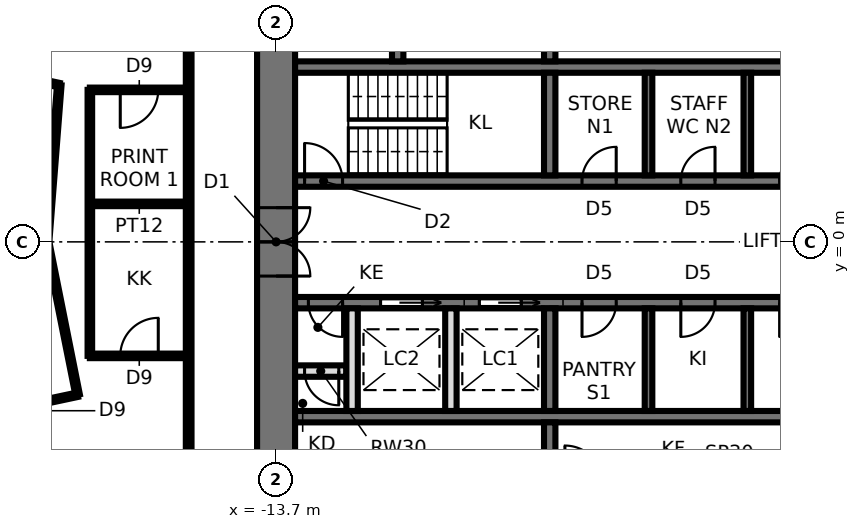
"""IFC4 building model, lengths in metres.
Left out: names, types, materials, properties, quantities, classifications, styles, units other than length and angle.
Written with IfcOpenShell. Run it as: python <this file> out.ifc"""

import sys

from ifc_helpers import new_model, si_unit, direction, frame, frame_2d, origin, place, context, subcontext, project, spatial, rectangle, extrude, element, fill, save


model = new_model("IFC4")
c1 = context("Model", 3, precision=1e-05, world=origin(), true_north=direction((0.0, 1.0)))
c2 = subcontext(c1, "Body", "Model", "MODEL_VIEW")
j1 = project(units=[si_unit("LENGTHUNIT", "METRE"), si_unit("PLANEANGLEUNIT", "RADIAN")], contexts=[c1])
p1 = place(None, origin())
s1 = spatial("IfcSite", under=j1, at=p1, CompositionType="ELEMENT")
p2 = place(p1, origin())
s2 = spatial("IfcBuilding", under=s1, at=p2, CompositionType="ELEMENT")
p3 = place(p2, frame((0.0, 0.0, 176.0)))
s3 = spatial("IfcBuildingStorey", under=s2, at=p3, CompositionType="ELEMENT", Elevation=176.0)
p4 = place(p3, frame((-13.7, 9.5, 0.0), z_axis=(0.0, 0.0, 1.0), x_axis=(0.0, -1.0, 0.0)))
e1 = element("IfcWall", 1, at=p4, inside=s3, PredefinedType="SHEAR", context=c2, shape_type="SweptSolid", body=[
    extrude(rectangle(XDim=19.0, YDim=1.0, at=frame_2d((9.5, 0.0))), origin(), (0.0, 0.0, 1.0), 3.9),
])
p5 = place(p4, frame((8.6, 0.0, 0.0)))
e2 = element("IfcOpeningElement", 2, at=p5, cuts=e1, PredefinedType="OPENING", context=c2, shape_type="SweptSolid", body=[
    extrude(rectangle(XDim=1.8, YDim=2.4, at=frame_2d((0.9, 1.2))), frame((0.0, 0.51, 0.0), z_axis=(0.0, -1.0, 0.0), x_axis=(1.0, 0.0, 0.0)), (0.0, 0.0, 1.0), 1.02),
])
p6 = place(p3, frame((-13.2, 1.6, 0.0), z_axis=(0.0, 0.0, 1.0), x_axis=(1.0, 0.0, 0.0)))
e3 = element("IfcWall", 3, at=p6, inside=s3, PredefinedType="SHEAR", context=c2, shape_type="SweptSolid", body=[
    extrude(rectangle(XDim=26.4, YDim=0.3, at=frame_2d((13.2, 0.0))), origin(), (0.0, 0.0, 1.0), 3.9),
])
p7 = place(p6, frame((0.25, 0.0, 0.0)))
e4 = element("IfcOpeningElement", 4, at=p7, cuts=e3, PredefinedType="OPENING", context=c2, shape_type="SweptSolid", body=[
    extrude(rectangle(XDim=1.0, YDim=2.1, at=frame_2d((0.5, 1.05))), frame((0.0, 0.16, 0.0), z_axis=(0.0, -1.0, 0.0), x_axis=(1.0, 0.0, 0.0)), (0.0, 0.0, 1.0), 0.32),
])
p8 = place(p6, frame((23.05, 0.0, 0.0)))
e5 = element("IfcOpeningElement", 5, at=p8, cuts=e3, PredefinedType="OPENING", context=c2, shape_type="SweptSolid", body=[
    extrude(rectangle(XDim=1.1, YDim=2.3, at=frame_2d((0.55, 1.15))), frame((0.0, 0.16, 0.0), z_axis=(0.0, -1.0, 0.0), x_axis=(1.0, 0.0, 0.0)), (0.0, 0.0, 1.0), 0.32),
])
p9 = place(p6, frame((20.25, 0.0, 0.0)))
e6 = element("IfcOpeningElement", 6, at=p9, cuts=e3, PredefinedType="OPENING", context=c2, shape_type="SweptSolid", body=[
    extrude(rectangle(XDim=1.5, YDim=2.4, at=frame_2d((0.75, 1.2))), frame((0.0, 0.16, 0.0), z_axis=(0.0, -1.0, 0.0), x_axis=(1.0, 0.0, 0.0)), (0.0, 0.0, 1.0), 0.32),
])
p10 = place(p6, frame((7.55, 0.0, 0.0)))
e7 = element("IfcOpeningElement", 7, at=p10, cuts=e3, PredefinedType="OPENING", context=c2, shape_type="SweptSolid", body=[
    extrude(rectangle(XDim=0.9, YDim=2.1, at=frame_2d((0.45, 1.05))), frame((0.0, 0.16, 0.0), z_axis=(0.0, -1.0, 0.0), x_axis=(1.0, 0.0, 0.0)), (0.0, 0.0, 1.0), 0.32),
])
p11 = place(p6, frame((10.15, 0.0, 0.0)))
e8 = element("IfcOpeningElement", 8, at=p11, cuts=e3, PredefinedType="OPENING", context=c2, shape_type="SweptSolid", body=[
    extrude(rectangle(XDim=0.9, YDim=2.1, at=frame_2d((0.45, 1.05))), frame((0.0, 0.16, 0.0), z_axis=(0.0, -1.0, 0.0), x_axis=(1.0, 0.0, 0.0)), (0.0, 0.0, 1.0), 0.32),
])
p12 = place(p6, frame((12.75, 0.0, 0.0)))
e9 = element("IfcOpeningElement", 9, at=p12, cuts=e3, PredefinedType="OPENING", context=c2, shape_type="SweptSolid", body=[
    extrude(rectangle(XDim=0.9, YDim=2.1, at=frame_2d((0.45, 1.05))), frame((0.0, 0.16, 0.0), z_axis=(0.0, -1.0, 0.0), x_axis=(1.0, 0.0, 0.0)), (0.0, 0.0, 1.0), 0.32),
])
p13 = place(p6, frame((25.45, 0.0, 0.0)))
e10 = element("IfcOpeningElement", 10, at=p13, cuts=e3, PredefinedType="OPENING", context=c2, shape_type="SweptSolid", body=[
    extrude(rectangle(XDim=0.9, YDim=2.1, at=frame_2d((0.45, 1.05))), frame((0.0, 0.16, 0.0), z_axis=(0.0, -1.0, 0.0), x_axis=(1.0, 0.0, 0.0)), (0.0, 0.0, 1.0), 0.32),
])
p14 = place(p3, frame((-13.2, -1.6, 0.0), z_axis=(0.0, 0.0, 1.0), x_axis=(1.0, 0.0, 0.0)))
e11 = element("IfcWall", 11, at=p14, inside=s3, PredefinedType="SHEAR", context=c2, shape_type="SweptSolid", body=[
    extrude(rectangle(XDim=26.4, YDim=0.3, at=frame_2d((13.2, 0.0))), origin(), (0.0, 0.0, 1.0), 3.9),
])
p15 = place(p14, frame((25.15, 0.0, 0.0)))
e12 = element("IfcOpeningElement", 12, at=p15, cuts=e11, PredefinedType="OPENING", context=c2, shape_type="SweptSolid", body=[
    extrude(rectangle(XDim=1.0, YDim=2.1, at=frame_2d((0.5, 1.05))), frame((0.0, 0.16, 0.0), z_axis=(0.0, -1.0, 0.0), x_axis=(1.0, 0.0, 0.0)), (0.0, 0.0, 1.0), 0.32),
])
p16 = place(p14, frame((7.55, 0.0, 0.0)))
e13 = element("IfcOpeningElement", 13, at=p16, cuts=e11, PredefinedType="OPENING", context=c2, shape_type="SweptSolid", body=[
    extrude(rectangle(XDim=0.9, YDim=2.1, at=frame_2d((0.45, 1.05))), frame((0.0, 0.16, 0.0), z_axis=(0.0, -1.0, 0.0), x_axis=(1.0, 0.0, 0.0)), (0.0, 0.0, 1.0), 0.32),
])
p17 = place(p14, frame((10.15, 0.0, 0.0)))
e14 = element("IfcOpeningElement", 14, at=p17, cuts=e11, PredefinedType="OPENING", context=c2, shape_type="SweptSolid", body=[
    extrude(rectangle(XDim=0.9, YDim=2.1, at=frame_2d((0.45, 1.05))), frame((0.0, 0.16, 0.0), z_axis=(0.0, -1.0, 0.0), x_axis=(1.0, 0.0, 0.0)), (0.0, 0.0, 1.0), 0.32),
])
p18 = place(p14, frame((12.75, 0.0, 0.0)))
e15 = element("IfcOpeningElement", 15, at=p18, cuts=e11, PredefinedType="OPENING", context=c2, shape_type="SweptSolid", body=[
    extrude(rectangle(XDim=0.9, YDim=2.1, at=frame_2d((0.45, 1.05))), frame((0.0, 0.16, 0.0), z_axis=(0.0, -1.0, 0.0), x_axis=(1.0, 0.0, 0.0)), (0.0, 0.0, 1.0), 0.32),
])
p19 = place(p14, frame((15.25, 0.0, 0.0)))
e16 = element("IfcOpeningElement", 16, at=p19, cuts=e11, PredefinedType="OPENING", context=c2, shape_type="SweptSolid", body=[
    extrude(rectangle(XDim=1.1, YDim=2.3, at=frame_2d((0.55, 1.15))), frame((0.0, 0.16, 0.0), z_axis=(0.0, -1.0, 0.0), x_axis=(1.0, 0.0, 0.0)), (0.0, 0.0, 1.0), 0.32),
])
p20 = place(p14, frame((17.85, 0.0, 0.0)))
e17 = element("IfcOpeningElement", 17, at=p20, cuts=e11, PredefinedType="OPENING", context=c2, shape_type="SweptSolid", body=[
    extrude(rectangle(XDim=1.1, YDim=2.3, at=frame_2d((0.55, 1.15))), frame((0.0, 0.16, 0.0), z_axis=(0.0, -1.0, 0.0), x_axis=(1.0, 0.0, 0.0)), (0.0, 0.0, 1.0), 0.32),
])
p21 = place(p14, frame((4.85, 0.0, 0.0)))
e18 = element("IfcOpeningElement", 18, at=p21, cuts=e11, PredefinedType="OPENING", context=c2, shape_type="SweptSolid", body=[
    extrude(rectangle(XDim=1.1, YDim=2.3, at=frame_2d((0.55, 1.15))), frame((0.0, 0.16, 0.0), z_axis=(0.0, -1.0, 0.0), x_axis=(1.0, 0.0, 0.0)), (0.0, 0.0, 1.0), 0.32),
])
p22 = place(p14, frame((2.25, 0.0, 0.0)))
e19 = element("IfcOpeningElement", 19, at=p22, cuts=e11, PredefinedType="OPENING", context=c2, shape_type="SweptSolid", body=[
    extrude(rectangle(XDim=1.1, YDim=2.3, at=frame_2d((0.55, 1.15))), frame((0.0, 0.16, 0.0), z_axis=(0.0, -1.0, 0.0), x_axis=(1.0, 0.0, 0.0)), (0.0, 0.0, 1.0), 0.32),
])
p23 = place(p14, frame((0.35, 0.0, 0.0)))
e20 = element("IfcOpeningElement", 20, at=p23, cuts=e11, PredefinedType="OPENING", context=c2, shape_type="SweptSolid", body=[
    extrude(rectangle(XDim=0.9, YDim=2.1, at=frame_2d((0.45, 1.05))), frame((0.0, 0.16, 0.0), z_axis=(0.0, -1.0, 0.0), x_axis=(1.0, 0.0, 0.0)), (0.0, 0.0, 1.0), 0.32),
])
for number, where, z_axis, x_axis in (
    (21, (-13.2, 4.6, 0.0), (0.0, 0.0, 1.0), (1.0, 0.0, 0.0)),
    (22, (-13.2, -4.6, 0.0), (0.0, 0.0, 1.0), (1.0, 0.0, 0.0)),
):
    element("IfcWall", number, at=place(p3, frame(where, z_axis=z_axis, x_axis=x_axis)), inside=s3, PredefinedType="SHEAR", context=c2, shape_type="SweptSolid", body=[
        extrude(rectangle(XDim=26.4, YDim=0.3, at=frame_2d((13.2, 0.0))), origin(), (0.0, 0.0, 1.0), 3.9),
    ])
p24 = place(p3, frame((-6.5, 1.75, 0.0), z_axis=(0.0, 0.0, 1.0), x_axis=(0.0, 1.0, 0.0)))
e23 = element("IfcWall", 23, at=p24, inside=s3, PredefinedType="SHEAR", context=c2, shape_type="SweptSolid", body=[
    extrude(rectangle(XDim=2.7, YDim=0.3, at=frame_2d((1.35, 0.0))), origin(), (0.0, 0.0, 1.0), 3.9),
])
p25 = place(p3, frame((-6.5, 4.75, 0.0), z_axis=(0.0, 0.0, 1.0), x_axis=(0.0, 1.0, 0.0)))
e24 = element("IfcWall", 24, at=p25, inside=s3, PredefinedType="SHEAR", context=c2, shape_type="SweptSolid", body=[
    extrude(rectangle(XDim=3.75, YDim=0.3, at=frame_2d((1.875, 0.0))), origin(), (0.0, 0.0, 1.0), 3.9),
])
for number, where, z_axis, x_axis in (
    (25, (-3.9, 1.75, 0.0), (0.0, 0.0, 1.0), (0.0, 1.0, 0.0)),
    (26, (-1.3, 1.75, 0.0), (0.0, 0.0, 1.0), (0.0, 1.0, 0.0)),
):
    element("IfcWall", number, at=place(p3, frame(where, z_axis=z_axis, x_axis=x_axis)), inside=s3, PredefinedType="SHEAR", context=c2, shape_type="SweptSolid", body=[
        extrude(rectangle(XDim=2.7, YDim=0.2, at=frame_2d((1.35, 0.0))), origin(), (0.0, 0.0, 1.0), 3.9),
    ])
p26 = place(p3, frame((-6.5, -1.75, 0.0), z_axis=(0.0, 0.0, 1.0), x_axis=(0.0, -1.0, 0.0)))
e27 = element("IfcWall", 27, at=p26, inside=s3, PredefinedType="SHEAR", context=c2, shape_type="SweptSolid", body=[
    extrude(rectangle(XDim=2.7, YDim=0.3, at=frame_2d((1.35, 0.0))), origin(), (0.0, 0.0, 1.0), 3.9),
])
p27 = place(p3, frame((-6.5, -4.75, 0.0), z_axis=(0.0, 0.0, 1.0), x_axis=(0.0, -1.0, 0.0)))
e28 = element("IfcWall", 28, at=p27, inside=s3, PredefinedType="SHEAR", context=c2, shape_type="SweptSolid", body=[
    extrude(rectangle(XDim=3.75, YDim=0.3, at=frame_2d((1.875, 0.0))), origin(), (0.0, 0.0, 1.0), 3.9),
])
for number, where, z_axis, x_axis in (
    (29, (-3.9, -1.75, 0.0), (0.0, 0.0, 1.0), (0.0, -1.0, 0.0)),
    (30, (-1.3, -1.75, 0.0), (0.0, 0.0, 1.0), (0.0, -1.0, 0.0)),
):
    element("IfcWall", number, at=place(p3, frame(where, z_axis=z_axis, x_axis=x_axis)), inside=s3, PredefinedType="SHEAR", context=c2, shape_type="SweptSolid", body=[
        extrude(rectangle(XDim=2.7, YDim=0.2, at=frame_2d((1.35, 0.0))), origin(), (0.0, 0.0, 1.0), 3.9),
    ])
p28 = place(p3, frame((-10.5, 4.75, 0.0), z_axis=(0.0, 0.0, 1.0), x_axis=(0.0, 1.0, 0.0)))
e31 = element("IfcWall", 31, at=p28, inside=s3, PredefinedType="SHEAR", context=c2, shape_type="SweptSolid", body=[
    extrude(rectangle(XDim=3.75, YDim=0.3, at=frame_2d((1.875, 0.0))), origin(), (0.0, 0.0, 1.0), 3.9),
])
p29 = place(p3, frame((-13.2, -3.4, 0.0), z_axis=(0.0, 0.0, 1.0), x_axis=(1.0, 0.0, 0.0)))
e32 = element("IfcWall", 32, at=p29, inside=s3, PredefinedType="SOLIDWALL", context=c2, shape_type="SweptSolid", body=[
    extrude(rectangle(XDim=1.35, YDim=0.3, at=frame_2d((0.675, 0.0))), origin(), (0.0, 0.0, 1.0), 3.74),
])
p30 = place(p29, frame((0.25, 0.0, 0.0)))
e33 = element("IfcOpeningElement", 33, at=p30, cuts=e32, PredefinedType="OPENING", context=c2, shape_type="SweptSolid", body=[
    extrude(rectangle(XDim=0.9, YDim=2.1, at=frame_2d((0.45, 1.05))), frame((0.0, 0.16, 0.0), z_axis=(0.0, -1.0, 0.0), x_axis=(1.0, 0.0, 0.0)), (0.0, 0.0, 1.0), 0.32),
])
for number, where, z_axis, x_axis in (
    (34, (-9.1, -1.75, 0.0), (0.0, 0.0, 1.0), (0.0, -1.0, 0.0)),
    (35, (-11.7, -1.75, 0.0), (0.0, 0.0, 1.0), (0.0, -1.0, 0.0)),
):
    element("IfcWall", number, at=place(p3, frame(where, z_axis=z_axis, x_axis=x_axis)), inside=s3, PredefinedType="SOLIDWALL", context=c2, shape_type="SweptSolid", body=[
        extrude(rectangle(XDim=2.7, YDim=0.3, at=frame_2d((1.35, 0.0))), origin(), (0.0, 0.0, 1.0), 3.74),
    ])
p31 = place(p3, frame((-18.922, -4.022, 0.0), z_axis=(0.0, 0.0, 1.0), x_axis=(-0.195944435797, 0.980614999926, 0.0)))
e36 = element("IfcWall", 36, at=p31, inside=s3, PredefinedType="PARTITIONING", context=c2, shape_type="SweptSolid", body=[
    extrude(rectangle(XDim=4.102, YDim=0.12, at=frame_2d((2.051, 0.0))), origin(), (0.0, 0.0, 1.0), 3.74),
])
p32 = place(p3, frame((-18.6, -3.0, 0.0), z_axis=(0.0, 0.0, 1.0), x_axis=(1.0, 0.0, 0.0)))
e37 = element("IfcWall", 37, at=p32, inside=s3, PredefinedType="PARTITIONING", context=c2, shape_type="SweptSolid", body=[
    extrude(rectangle(XDim=2.6, YDim=0.12, at=frame_2d((1.3, 0.0))), origin(), (0.0, 0.0, 1.0), 3.74),
])
p33 = place(p32, frame((0.8, 0.0, 0.0)))
e38 = element("IfcOpeningElement", 38, at=p33, cuts=e37, PredefinedType="OPENING", context=c2, shape_type="SweptSolid", body=[
    extrude(rectangle(XDim=1.0, YDim=2.4, at=frame_2d((0.5, 1.2))), frame((0.0, 0.07, 0.0), z_axis=(0.0, -1.0, 0.0), x_axis=(1.0, 0.0, 0.0)), (0.0, 0.0, 1.0), 0.14),
])
p34 = place(p3, frame((-22.835, -4.854, 0.0), z_axis=(0.0, 0.0, 1.0), x_axis=(0.978152955943, 0.207886494942, 0.0)))
e39 = element("IfcWall", 39, at=p34, inside=s3, PredefinedType="PARTITIONING", context=c2, shape_type="SweptSolid", body=[
    extrude(rectangle(XDim=4.0, YDim=0.12, at=frame_2d((2.0, 0.0))), origin(), (0.0, 0.0, 1.0), 3.74),
])
p35 = place(p34, frame((1.474, 0.0, 0.0)))
e40 = element("IfcOpeningElement", 40, at=p35, cuts=e39, PredefinedType="OPENING", context=c2, shape_type="SweptSolid", body=[
    extrude(rectangle(XDim=1.0, YDim=2.4, at=frame_2d((0.5, 1.2))), frame((0.0, 0.07, 0.0), z_axis=(0.0, -1.0, 0.0), x_axis=(1.0, 0.0, 0.0)), (0.0, 0.0, 1.0), 0.14),
])
p36 = place(p3, frame((-16.0, 4.0, 0.0), z_axis=(0.0, 0.0, 1.0), x_axis=(-1.0, 0.0, 0.0)))
e41 = element("IfcWall", 41, at=p36, inside=s3, PredefinedType="PARTITIONING", context=c2, shape_type="SweptSolid", body=[
    extrude(rectangle(XDim=2.6, YDim=0.12, at=frame_2d((1.3, 0.0))), origin(), (0.0, 0.0, 1.0), 3.74),
])
p37 = place(p36, frame((0.8, 0.0, 0.0)))
e42 = element("IfcOpeningElement", 42, at=p37, cuts=e41, PredefinedType="OPENING", context=c2, shape_type="SweptSolid", body=[
    extrude(rectangle(XDim=1.0, YDim=2.4, at=frame_2d((0.5, 1.2))), frame((0.0, 0.07, 0.0), z_axis=(0.0, -1.0, 0.0), x_axis=(1.0, 0.0, 0.0)), (0.0, 0.0, 1.0), 0.14),
])
p38 = place(p3, frame((-19.405, 4.125, 0.0), z_axis=(0.0, 0.0, 1.0), x_axis=(-0.978140543132, 0.207944891454, 0.0)))
e43 = element("IfcWall", 43, at=p38, inside=s3, PredefinedType="PARTITIONING", context=c2, shape_type="SweptSolid", body=[
    extrude(rectangle(XDim=4.0, YDim=0.12, at=frame_2d((2.0, 0.0))), origin(), (0.0, 0.0, 1.0), 3.74),
])
p39 = place(p38, frame((1.474, 0.0, 0.0)))
e44 = element("IfcOpeningElement", 44, at=p39, cuts=e43, PredefinedType="OPENING", context=c2, shape_type="SweptSolid", body=[
    extrude(rectangle(XDim=1.0, YDim=2.4, at=frame_2d((0.5, 1.2))), frame((0.0, 0.07, 0.0), z_axis=(0.0, -1.0, 0.0), x_axis=(1.0, 0.0, 0.0)), (0.0, 0.0, 1.0), 0.14),
])
p40 = place(p3, frame((-19.726, 0.0, 0.0), z_axis=(0.0, 0.0, 1.0), x_axis=(0.077720864456, 0.996975158782, 0.0)))
e45 = element("IfcWall", 45, at=p40, inside=s3, PredefinedType="PARTITIONING", context=c2, shape_type="SweptSolid", body=[
    extrude(rectangle(XDim=4.137, YDim=0.12, at=frame_2d((2.068, 0.0))), origin(), (0.0, 0.0, 1.0), 3.74),
])
p41 = place(p3, frame((-18.6, 1.0, 0.0), z_axis=(0.0, 0.0, 1.0), x_axis=(1.0, 0.0, 0.0)))
e46 = element("IfcWall", 46, at=p41, inside=s3, PredefinedType="PARTITIONING", context=c2, shape_type="SweptSolid", body=[
    extrude(rectangle(XDim=2.6, YDim=0.12, at=frame_2d((1.3, 0.0))), origin(), (0.0, 0.0, 1.0), 3.74),
])
p42 = place(p3, frame((-18.6, 4.0, 0.0), z_axis=(0.0, 0.0, 1.0), x_axis=(0.0, -1.0, 0.0)))
e47 = element("IfcWall", 47, at=p42, inside=s3, PredefinedType="PARTITIONING", context=c2, shape_type="SweptSolid", body=[
    extrude(rectangle(XDim=7.0, YDim=0.12, at=frame_2d((3.5, 0.0))), origin(), (0.0, 0.0, 1.0), 3.74),
])
p43 = place(p3, frame((-16.0, 11.3, 0.0), z_axis=(0.0, 0.0, 1.0), x_axis=(0.0, -1.0, 0.0)))
e48 = element("IfcWall", 48, at=p43, inside=s3, PredefinedType="PARTITIONING", context=c2, shape_type="SweptSolid", body=[
    extrude(rectangle(XDim=22.6, YDim=0.15, at=frame_2d((11.3, 0.0))), origin(), (0.0, 0.0, 1.0), 3.74),
])
p44 = place(p5, origin())
e49 = element("IfcDoor", 49, at=p44, inside=s3, OperationType="DOUBLE_DOOR_SINGLE_SWING", PredefinedType="DOOR", context=c2, shape_type="SweptSolid", body=[
    extrude(rectangle(XDim=1.72, YDim=2.36, at=frame_2d((0.9, 1.18))), frame((0.0, 0.025, 0.0), z_axis=(0.0, -1.0, 0.0), x_axis=(1.0, 0.0, 0.0)), (0.0, 0.0, 1.0), 0.05),
    extrude(rectangle(XDim=0.04, YDim=2.4, at=frame_2d((0.02, 1.2))), frame((0.0, 0.25, 0.0), z_axis=(0.0, -1.0, 0.0), x_axis=(1.0, 0.0, 0.0)), (0.0, 0.0, 1.0), 0.5),
    extrude(rectangle(XDim=0.04, YDim=2.4, at=frame_2d((1.78, 1.2))), frame((0.0, 0.25, 0.0), z_axis=(0.0, -1.0, 0.0), x_axis=(1.0, 0.0, 0.0)), (0.0, 0.0, 1.0), 0.5),
    extrude(rectangle(XDim=1.72, YDim=0.04, at=frame_2d((0.9, 2.38))), frame((0.0, 0.25, 0.0), z_axis=(0.0, -1.0, 0.0), x_axis=(1.0, 0.0, 0.0)), (0.0, 0.0, 1.0), 0.5),
])
fill(e2, e49)
p45 = place(p7, origin())
e50 = element("IfcDoor", 50, at=p45, inside=s3, OperationType="SINGLE_SWING_LEFT", PredefinedType="DOOR", context=c2, shape_type="SweptSolid", body=[
    extrude(rectangle(XDim=1.0, YDim=2.1, at=frame_2d((0.5, 1.05))), frame((0.0, 0.025, 0.0), z_axis=(0.0, -1.0, 0.0), x_axis=(1.0, 0.0, 0.0)), (0.0, 0.0, 1.0), 0.05),
])
fill(e4, e50)
p46 = place(p10, origin())
e51 = element("IfcDoor", 51, at=p46, inside=s3, OperationType="SINGLE_SWING_RIGHT", PredefinedType="DOOR", context=c2, shape_type="SweptSolid", body=[
    extrude(rectangle(XDim=0.9, YDim=2.1, at=frame_2d((0.45, 1.05))), frame((0.0, 0.025, 0.0), z_axis=(0.0, -1.0, 0.0), x_axis=(1.0, 0.0, 0.0)), (0.0, 0.0, 1.0), 0.05),
])
fill(e7, e51)
p47 = place(p11, origin())
e52 = element("IfcDoor", 52, at=p47, inside=s3, OperationType="SINGLE_SWING_RIGHT", PredefinedType="DOOR", context=c2, shape_type="SweptSolid", body=[
    extrude(rectangle(XDim=0.9, YDim=2.1, at=frame_2d((0.45, 1.05))), frame((0.0, 0.025, 0.0), z_axis=(0.0, -1.0, 0.0), x_axis=(1.0, 0.0, 0.0)), (0.0, 0.0, 1.0), 0.05),
])
fill(e8, e52)
p48 = place(p16, frame((0.9, 0.0, 0.0), z_axis=(0.0, 0.0, 1.0), x_axis=(-1.0, 0.0, 0.0)))
e53 = element("IfcDoor", 53, at=p48, inside=s3, OperationType="SINGLE_SWING_RIGHT", PredefinedType="DOOR", context=c2, shape_type="SweptSolid", body=[
    extrude(rectangle(XDim=0.9, YDim=2.1, at=frame_2d((0.45, 1.05))), frame((0.0, 0.025, 0.0), z_axis=(0.0, -1.0, 0.0), x_axis=(1.0, 0.0, 0.0)), (0.0, 0.0, 1.0), 0.05),
])
fill(e13, e53)
p49 = place(p17, frame((0.9, 0.0, 0.0), z_axis=(0.0, 0.0, 1.0), x_axis=(-1.0, 0.0, 0.0)))
e54 = element("IfcDoor", 54, at=p49, inside=s3, OperationType="SINGLE_SWING_RIGHT", PredefinedType="DOOR", context=c2, shape_type="SweptSolid", body=[
    extrude(rectangle(XDim=0.9, YDim=2.1, at=frame_2d((0.45, 1.05))), frame((0.0, 0.025, 0.0), z_axis=(0.0, -1.0, 0.0), x_axis=(1.0, 0.0, 0.0)), (0.0, 0.0, 1.0), 0.05),
])
fill(e14, e54)
p50 = place(p21, frame((1.1, 0.0, 0.0), z_axis=(0.0, 0.0, 1.0), x_axis=(-1.0, 0.0, 0.0)))
e55 = element("IfcDoor", 55, at=p50, inside=s3, OperationType="SLIDING_TO_LEFT", PredefinedType="DOOR", context=c2, shape_type="SweptSolid", body=[
    extrude(rectangle(XDim=1.1, YDim=2.3, at=frame_2d((0.55, 1.15))), frame((0.0, 0.025, 0.0), z_axis=(0.0, -1.0, 0.0), x_axis=(1.0, 0.0, 0.0)), (0.0, 0.0, 1.0), 0.05),
])
fill(e18, e55)
p51 = place(p22, frame((1.1, 0.0, 0.0), z_axis=(0.0, 0.0, 1.0), x_axis=(-1.0, 0.0, 0.0)))
e56 = element("IfcDoor", 56, at=p51, inside=s3, OperationType="SLIDING_TO_LEFT", PredefinedType="DOOR", context=c2, shape_type="SweptSolid", body=[
    extrude(rectangle(XDim=1.1, YDim=2.3, at=frame_2d((0.55, 1.15))), frame((0.0, 0.025, 0.0), z_axis=(0.0, -1.0, 0.0), x_axis=(1.0, 0.0, 0.0)), (0.0, 0.0, 1.0), 0.05),
])
fill(e19, e56)
p52 = place(p23, frame((0.9, 0.0, 0.0), z_axis=(0.0, 0.0, 1.0), x_axis=(-1.0, 0.0, 0.0)))
e57 = element("IfcDoor", 57, at=p52, inside=s3, OperationType="SINGLE_SWING_LEFT", PredefinedType="DOOR", context=c2, shape_type="SweptSolid", body=[
    extrude(rectangle(XDim=0.9, YDim=2.1, at=frame_2d((0.45, 1.05))), frame((0.0, 0.025, 0.0), z_axis=(0.0, -1.0, 0.0), x_axis=(1.0, 0.0, 0.0)), (0.0, 0.0, 1.0), 0.05),
])
fill(e20, e57)
p53 = place(p30, frame((0.9, 0.0, 0.0), z_axis=(0.0, 0.0, 1.0), x_axis=(-1.0, 0.0, 0.0)))
e58 = element("IfcDoor", 58, at=p53, inside=s3, OperationType="SINGLE_SWING_LEFT", PredefinedType="DOOR", context=c2, shape_type="SweptSolid", body=[
    extrude(rectangle(XDim=0.9, YDim=2.1, at=frame_2d((0.45, 1.05))), frame((0.0, 0.025, 0.0), z_axis=(0.0, -1.0, 0.0), x_axis=(1.0, 0.0, 0.0)), (0.0, 0.0, 1.0), 0.05),
])
fill(e33, e58)
p54 = place(p33, origin())
e59 = element("IfcDoor", 59, at=p54, inside=s3, OperationType="SINGLE_SWING_RIGHT", PredefinedType="DOOR", context=c2, shape_type="SweptSolid", body=[
    extrude(rectangle(XDim=1.0, YDim=2.4, at=frame_2d((0.5, 1.2))), frame((0.0, 0.025, 0.0), z_axis=(0.0, -1.0, 0.0), x_axis=(1.0, 0.0, 0.0)), (0.0, 0.0, 1.0), 0.05),
])
fill(e38, e59)
p55 = place(p37, origin())
e60 = element("IfcDoor", 60, at=p55, inside=s3, OperationType="SINGLE_SWING_RIGHT", PredefinedType="DOOR", context=c2, shape_type="SweptSolid", body=[
    extrude(rectangle(XDim=1.0, YDim=2.4, at=frame_2d((0.5, 1.2))), frame((0.0, 0.025, 0.0), z_axis=(0.0, -1.0, 0.0), x_axis=(1.0, 0.0, 0.0)), (0.0, 0.0, 1.0), 0.05),
])
fill(e42, e60)
save(model, sys.argv[1])
